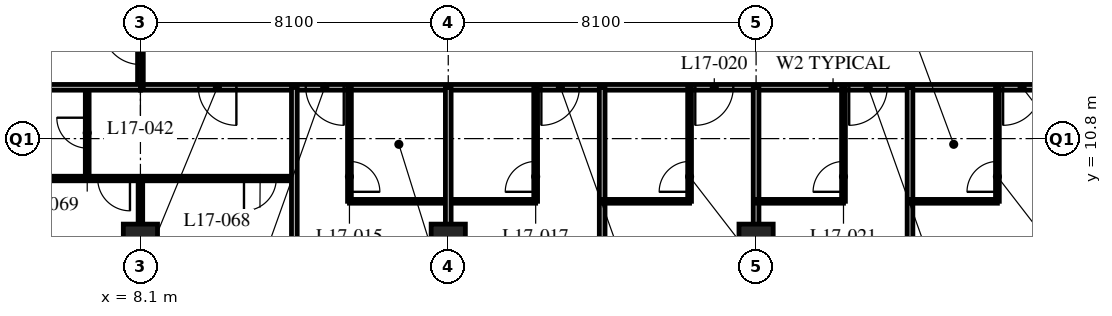
"""IFC4 building model, lengths in metres.
Left out: names, types, materials, properties, quantities, classifications, styles, units other than length and angle.
Written with IfcOpenShell. Run it as: python <this file> out.ifc"""

import sys

from ifc_helpers import new_model, si_unit, direction, frame, frame_2d, origin, origin_2d, place, context, subcontext, project, spatial, rectangle, hollow_rectangle, extrude, element, fill, save


model = new_model("IFC4")
c1 = context("Model", 3, precision=1e-05, world=origin(), true_north=direction((0.0, 1.0)))
c2 = subcontext(c1, "Body", "Model", "MODEL_VIEW")
j1 = project(units=[si_unit("LENGTHUNIT", "METRE"), si_unit("PLANEANGLEUNIT", "RADIAN")], contexts=[c1])
p1 = place(None, origin())
s1 = spatial("IfcSite", under=j1, at=p1, CompositionType="ELEMENT")
p2 = place(p1, origin())
s2 = spatial("IfcBuilding", under=s1, at=p2, CompositionType="ELEMENT")
p3 = place(p2, frame((0.0, 0.0, 70.4)))
s3 = spatial("IfcBuildingStorey", under=s2, at=p3, CompositionType="ELEMENT", Elevation=70.4)
for number, where, z_axis, x_axis in (
    (1, (8.1, 8.1, 0.0), (0.0, 0.0, 1.0), (1.0, 0.0, 0.0)),
    (2, (16.2, 8.1, 0.0), (0.0, 0.0, 1.0), (1.0, 0.0, 0.0)),
    (3, (24.3, 8.1, 0.0), (0.0, 0.0, 1.0), (1.0, 0.0, 0.0)),
):
    element("IfcColumn", number, at=place(p3, frame(where, z_axis=z_axis, x_axis=x_axis)), inside=s3, PredefinedType="COLUMN", context=c2, shape_type="SweptSolid", body=[
        extrude(hollow_rectangle(XDim=0.9, YDim=0.9, WallThickness=0.09, at=origin_2d()), origin(), (0.0, 0.0, 1.0), 3.4),
    ])
p4 = place(p3, frame((8.1, 12.15, 0.0), z_axis=(0.0, 0.0, 1.0), x_axis=(1.0, 0.0, 0.0)))
e4 = element("IfcWall", 4, at=p4, inside=s3, PredefinedType="PARTITIONING", context=c2, shape_type="SweptSolid", body=[
    extrude(rectangle(XDim=36.45, YDim=0.15, at=frame_2d((18.225, 0.0))), origin(), (0.0, 0.0, 1.0), 3.19),
])
p5 = place(p4, frame((4.35, 0.0, 0.0)))
e5 = element("IfcOpeningElement", 5, at=p5, cuts=e4, PredefinedType="OPENING", context=c2, shape_type="SweptSolid", body=[
    extrude(rectangle(XDim=1.0, YDim=2.1, at=frame_2d((0.5, 1.05))), frame((0.0, 0.085, 0.0), z_axis=(0.0, -1.0, 0.0), x_axis=(1.0, 0.0, 0.0)), (0.0, 0.0, 1.0), 0.17),
])
p6 = place(p4, frame((10.55, 0.0, 0.0)))
e6 = element("IfcOpeningElement", 6, at=p6, cuts=e4, PredefinedType="OPENING", context=c2, shape_type="SweptSolid", body=[
    extrude(rectangle(XDim=1.0, YDim=2.1, at=frame_2d((0.5, 1.05))), frame((0.0, 0.085, 0.0), z_axis=(0.0, -1.0, 0.0), x_axis=(1.0, 0.0, 0.0)), (0.0, 0.0, 1.0), 0.17),
])
p7 = place(p4, frame((14.6, 0.0, 0.0)))
e7 = element("IfcOpeningElement", 7, at=p7, cuts=e4, PredefinedType="OPENING", context=c2, shape_type="SweptSolid", body=[
    extrude(rectangle(XDim=1.0, YDim=2.1, at=frame_2d((0.5, 1.05))), frame((0.0, 0.085, 0.0), z_axis=(0.0, -1.0, 0.0), x_axis=(1.0, 0.0, 0.0)), (0.0, 0.0, 1.0), 0.17),
])
p8 = place(p4, frame((18.65, 0.0, 0.0)))
e8 = element("IfcOpeningElement", 8, at=p8, cuts=e4, PredefinedType="OPENING", context=c2, shape_type="SweptSolid", body=[
    extrude(rectangle(XDim=1.0, YDim=2.1, at=frame_2d((0.5, 1.05))), frame((0.0, 0.085, 0.0), z_axis=(0.0, -1.0, 0.0), x_axis=(1.0, 0.0, 0.0)), (0.0, 0.0, 1.0), 0.17),
])
p9 = place(p4, frame((22.7, 0.0, 0.0)))
e9 = element("IfcOpeningElement", 9, at=p9, cuts=e4, PredefinedType="OPENING", context=c2, shape_type="SweptSolid", body=[
    extrude(rectangle(XDim=1.0, YDim=2.1, at=frame_2d((0.5, 1.05))), frame((0.0, 0.085, 0.0), z_axis=(0.0, -1.0, 0.0), x_axis=(1.0, 0.0, 0.0)), (0.0, 0.0, 1.0), 0.17),
])
p10 = place(p4, frame((24.6, 0.0, 0.0)))
e10 = element("IfcOpeningElement", 10, at=p10, cuts=e4, PredefinedType="OPENING", context=c2, shape_type="SweptSolid", body=[
    extrude(rectangle(XDim=1.0, YDim=2.1, at=frame_2d((0.5, 1.05))), frame((0.0, 0.085, 0.0), z_axis=(0.0, -1.0, 0.0), x_axis=(1.0, 0.0, 0.0)), (0.0, 0.0, 1.0), 0.17),
])
p11 = place(p4, frame((30.8, 0.0, 0.0)))
e11 = element("IfcOpeningElement", 11, at=p11, cuts=e4, PredefinedType="OPENING", context=c2, shape_type="SweptSolid", body=[
    extrude(rectangle(XDim=1.0, YDim=2.1, at=frame_2d((0.5, 1.05))), frame((0.0, 0.085, 0.0), z_axis=(0.0, -1.0, 0.0), x_axis=(1.0, 0.0, 0.0)), (0.0, 0.0, 1.0), 0.17),
])
p12 = place(p4, frame((1.525, 0.0, 0.0)))
e12 = element("IfcOpeningElement", 12, at=p12, cuts=e4, PredefinedType="OPENING", context=c2, shape_type="SweptSolid", body=[
    extrude(rectangle(XDim=1.0, YDim=2.1, at=frame_2d((0.5, 1.05))), frame((0.0, 0.085, 0.0), z_axis=(0.0, -1.0, 0.0), x_axis=(1.0, 0.0, 0.0)), (0.0, 0.0, 1.0), 0.17),
])
p13 = place(p4, frame((33.925, 0.0, 0.0)))
e13 = element("IfcOpeningElement", 13, at=p13, cuts=e4, PredefinedType="OPENING", context=c2, shape_type="SweptSolid", body=[
    extrude(rectangle(XDim=1.0, YDim=2.1, at=frame_2d((0.5, 1.05))), frame((0.0, 0.085, 0.0), z_axis=(0.0, -1.0, 0.0), x_axis=(1.0, 0.0, 0.0)), (0.0, 0.0, 1.0), 0.17),
])
p14 = place(p3, frame((8.1, 12.15, 0.0), z_axis=(0.0, 0.0, 1.0), x_axis=(0.0, 1.0, 0.0)))
e14 = element("IfcWall", 14, at=p14, inside=s3, PredefinedType="PARTITIONING", context=c2, shape_type="SweptSolid", body=[
    extrude(rectangle(XDim=30.15, YDim=0.15, at=frame_2d((15.075, 0.0))), origin(), (0.0, 0.0, 1.0), 2.578),
])
p15 = place(p14, frame((0.6, 0.0, 0.0)))
e15 = element("IfcOpeningElement", 15, at=p15, cuts=e14, PredefinedType="OPENING", context=c2, shape_type="SweptSolid", body=[
    extrude(rectangle(XDim=1.0, YDim=2.1, at=frame_2d((0.5, 1.05))), frame((0.0, 0.085, 0.0), z_axis=(0.0, -1.0, 0.0), x_axis=(1.0, 0.0, 0.0)), (0.0, 0.0, 1.0), 0.17),
])
p16 = place(p14, frame((6.8, 0.0, 0.0)))
e16 = element("IfcOpeningElement", 16, at=p16, cuts=e14, PredefinedType="OPENING", context=c2, shape_type="SweptSolid", body=[
    extrude(rectangle(XDim=1.0, YDim=2.1, at=frame_2d((0.5, 1.05))), frame((0.0, 0.085, 0.0), z_axis=(0.0, -1.0, 0.0), x_axis=(1.0, 0.0, 0.0)), (0.0, 0.0, 1.0), 0.17),
])
p17 = place(p14, frame((8.7, 0.0, 0.0)))
e17 = element("IfcOpeningElement", 17, at=p17, cuts=e14, PredefinedType="OPENING", context=c2, shape_type="SweptSolid", body=[
    extrude(rectangle(XDim=1.0, YDim=2.1, at=frame_2d((0.5, 1.05))), frame((0.0, 0.085, 0.0), z_axis=(0.0, -1.0, 0.0), x_axis=(1.0, 0.0, 0.0)), (0.0, 0.0, 1.0), 0.17),
])
p18 = place(p14, frame((14.6, 0.0, 0.0)))
e18 = element("IfcOpeningElement", 18, at=p18, cuts=e14, PredefinedType="OPENING", context=c2, shape_type="SweptSolid", body=[
    extrude(rectangle(XDim=1.0, YDim=2.1, at=frame_2d((0.5, 1.05))), frame((0.0, 0.085, 0.0), z_axis=(0.0, -1.0, 0.0), x_axis=(1.0, 0.0, 0.0)), (0.0, 0.0, 1.0), 0.17),
])
p19 = place(p14, frame((21.65, 0.0, 0.0)))
e19 = element("IfcOpeningElement", 19, at=p19, cuts=e14, PredefinedType="OPENING", context=c2, shape_type="SweptSolid", body=[
    extrude(rectangle(XDim=1.0, YDim=2.1, at=frame_2d((0.5, 1.05))), frame((0.0, 0.085, 0.0), z_axis=(0.0, -1.0, 0.0), x_axis=(1.0, 0.0, 0.0)), (0.0, 0.0, 1.0), 0.17),
])
p20 = place(p14, frame((26.75, 0.0, 0.0)))
e20 = element("IfcOpeningElement", 20, at=p20, cuts=e14, PredefinedType="OPENING", context=c2, shape_type="SweptSolid", body=[
    extrude(rectangle(XDim=1.0, YDim=2.1, at=frame_2d((0.5, 1.05))), frame((0.0, 0.085, 0.0), z_axis=(0.0, -1.0, 0.0), x_axis=(1.0, 0.0, 0.0)), (0.0, 0.0, 1.0), 0.17),
])
p21 = place(p3, frame((13.6, 9.15, 0.0), z_axis=(0.0, 0.0, 1.0), x_axis=(1.0, 0.0, 0.0)))
e21 = element("IfcWall", 21, at=p21, inside=s3, PredefinedType="PARTITIONING", context=c2, shape_type="SweptSolid", body=[
    extrude(rectangle(XDim=4.9, YDim=0.1, at=frame_2d((2.45, 0.0))), origin(), (0.0, 0.0, 1.0), 3.19),
])
p22 = place(p3, frame((13.6, 12.15, 0.0), z_axis=(0.0, 0.0, 1.0), x_axis=(0.0, -1.0, 0.0)))
e22 = element("IfcWall", 22, at=p22, inside=s3, PredefinedType="PARTITIONING", context=c2, shape_type="SweptSolid", body=[
    extrude(rectangle(XDim=3.0, YDim=0.1, at=frame_2d((1.5, 0.0))), origin(), (0.0, 0.0, 1.0), 3.19),
])
p23 = place(p22, frame((1.95, 0.0, 0.0)))
e23 = element("IfcOpeningElement", 23, at=p23, cuts=e22, PredefinedType="OPENING", context=c2, shape_type="SweptSolid", body=[
    extrude(rectangle(XDim=0.8, YDim=2.1, at=frame_2d((0.4, 1.05))), frame((0.0, 0.06, 0.0), z_axis=(0.0, -1.0, 0.0), x_axis=(1.0, 0.0, 0.0)), (0.0, 0.0, 1.0), 0.12),
])
p24 = place(p3, frame((16.2, 12.15, 0.0), z_axis=(0.0, 0.0, 1.0), x_axis=(0.0, -1.0, 0.0)))
e24 = element("IfcWall", 24, at=p24, inside=s3, PredefinedType="PARTITIONING", context=c2, shape_type="SweptSolid", body=[
    extrude(rectangle(XDim=11.85, YDim=0.15, at=frame_2d((5.925, 0.0))), origin(), (0.0, 0.0, 1.0), 2.578),
])
p25 = place(p3, frame((18.5, 12.15, 0.0), z_axis=(0.0, 0.0, 1.0), x_axis=(0.0, -1.0, 0.0)))
e25 = element("IfcWall", 25, at=p25, inside=s3, PredefinedType="PARTITIONING", context=c2, shape_type="SweptSolid", body=[
    extrude(rectangle(XDim=3.0, YDim=0.1, at=frame_2d((1.5, 0.0))), origin(), (0.0, 0.0, 1.0), 3.19),
])
p26 = place(p25, frame((1.95, 0.0, 0.0)))
e26 = element("IfcOpeningElement", 26, at=p26, cuts=e25, PredefinedType="OPENING", context=c2, shape_type="SweptSolid", body=[
    extrude(rectangle(XDim=0.8, YDim=2.1, at=frame_2d((0.4, 1.05))), frame((0.0, 0.06, 0.0), z_axis=(0.0, -1.0, 0.0), x_axis=(1.0, 0.0, 0.0)), (0.0, 0.0, 1.0), 0.12),
])
p27 = place(p3, frame((20.25, 12.15, 0.0), z_axis=(0.0, 0.0, 1.0), x_axis=(0.0, -1.0, 0.0)))
e27 = element("IfcWall", 27, at=p27, inside=s3, PredefinedType="PARTITIONING", context=c2, shape_type="SweptSolid", body=[
    extrude(rectangle(XDim=11.85, YDim=0.15, at=frame_2d((5.925, 0.0))), origin(), (0.0, 0.0, 1.0), 3.19),
])
p28 = place(p3, frame((20.25, 9.15, 0.0), z_axis=(0.0, 0.0, 1.0), x_axis=(1.0, 0.0, 0.0)))
e28 = element("IfcWall", 28, at=p28, inside=s3, PredefinedType="PARTITIONING", context=c2, shape_type="SweptSolid", body=[
    extrude(rectangle(XDim=2.3, YDim=0.1, at=frame_2d((1.15, 0.0))), origin(), (0.0, 0.0, 1.0), 3.19),
])
p29 = place(p3, frame((22.55, 12.15, 0.0), z_axis=(0.0, 0.0, 1.0), x_axis=(0.0, -1.0, 0.0)))
e29 = element("IfcWall", 29, at=p29, inside=s3, PredefinedType="PARTITIONING", context=c2, shape_type="SweptSolid", body=[
    extrude(rectangle(XDim=3.0, YDim=0.1, at=frame_2d((1.5, 0.0))), origin(), (0.0, 0.0, 1.0), 3.19),
])
p30 = place(p29, frame((1.95, 0.0, 0.0)))
e30 = element("IfcOpeningElement", 30, at=p30, cuts=e29, PredefinedType="OPENING", context=c2, shape_type="SweptSolid", body=[
    extrude(rectangle(XDim=0.8, YDim=2.1, at=frame_2d((0.4, 1.05))), frame((0.0, 0.06, 0.0), z_axis=(0.0, -1.0, 0.0), x_axis=(1.0, 0.0, 0.0)), (0.0, 0.0, 1.0), 0.12),
])
p31 = place(p3, frame((24.3, 12.15, 0.0), z_axis=(0.0, 0.0, 1.0), x_axis=(0.0, -1.0, 0.0)))
e31 = element("IfcWall", 31, at=p31, inside=s3, PredefinedType="PARTITIONING", context=c2, shape_type="SweptSolid", body=[
    extrude(rectangle(XDim=11.85, YDim=0.15, at=frame_2d((5.925, 0.0))), origin(), (0.0, 0.0, 1.0), 2.578),
])
p32 = place(p3, frame((24.3, 9.15, 0.0), z_axis=(0.0, 0.0, 1.0), x_axis=(1.0, 0.0, 0.0)))
e32 = element("IfcWall", 32, at=p32, inside=s3, PredefinedType="PARTITIONING", context=c2, shape_type="SweptSolid", body=[
    extrude(rectangle(XDim=2.3, YDim=0.1, at=frame_2d((1.15, 0.0))), origin(), (0.0, 0.0, 1.0), 3.19),
])
p33 = place(p3, frame((26.6, 12.15, 0.0), z_axis=(0.0, 0.0, 1.0), x_axis=(0.0, -1.0, 0.0)))
e33 = element("IfcWall", 33, at=p33, inside=s3, PredefinedType="PARTITIONING", context=c2, shape_type="SweptSolid", body=[
    extrude(rectangle(XDim=3.0, YDim=0.1, at=frame_2d((1.5, 0.0))), origin(), (0.0, 0.0, 1.0), 3.19),
])
p34 = place(p33, frame((1.95, 0.0, 0.0)))
e34 = element("IfcOpeningElement", 34, at=p34, cuts=e33, PredefinedType="OPENING", context=c2, shape_type="SweptSolid", body=[
    extrude(rectangle(XDim=0.8, YDim=2.1, at=frame_2d((0.4, 1.05))), frame((0.0, 0.06, 0.0), z_axis=(0.0, -1.0, 0.0), x_axis=(1.0, 0.0, 0.0)), (0.0, 0.0, 1.0), 0.12),
])
p35 = place(p3, frame((28.35, 12.15, 0.0), z_axis=(0.0, 0.0, 1.0), x_axis=(0.0, -1.0, 0.0)))
e35 = element("IfcWall", 35, at=p35, inside=s3, PredefinedType="PARTITIONING", context=c2, shape_type="SweptSolid", body=[
    extrude(rectangle(XDim=11.85, YDim=0.15, at=frame_2d((5.925, 0.0))), origin(), (0.0, 0.0, 1.0), 3.19),
])
p36 = place(p3, frame((28.35, 9.15, 0.0), z_axis=(0.0, 0.0, 1.0), x_axis=(1.0, 0.0, 0.0)))
e36 = element("IfcWall", 36, at=p36, inside=s3, PredefinedType="PARTITIONING", context=c2, shape_type="SweptSolid", body=[
    extrude(rectangle(XDim=2.3, YDim=0.1, at=frame_2d((1.15, 0.0))), origin(), (0.0, 0.0, 1.0), 3.19),
])
p37 = place(p3, frame((30.65, 12.15, 0.0), z_axis=(0.0, 0.0, 1.0), x_axis=(0.0, -1.0, 0.0)))
e37 = element("IfcWall", 37, at=p37, inside=s3, PredefinedType="PARTITIONING", context=c2, shape_type="SweptSolid", body=[
    extrude(rectangle(XDim=3.0, YDim=0.1, at=frame_2d((1.5, 0.0))), origin(), (0.0, 0.0, 1.0), 3.19),
])
p38 = place(p37, frame((1.95, 0.0, 0.0)))
e38 = element("IfcOpeningElement", 38, at=p38, cuts=e37, PredefinedType="OPENING", context=c2, shape_type="SweptSolid", body=[
    extrude(rectangle(XDim=0.8, YDim=2.1, at=frame_2d((0.4, 1.05))), frame((0.0, 0.06, 0.0), z_axis=(0.0, -1.0, 0.0), x_axis=(1.0, 0.0, 0.0)), (0.0, 0.0, 1.0), 0.12),
])
p39 = place(p3, frame((6.7, 12.15, 0.0), z_axis=(0.0, 0.0, 1.0), x_axis=(0.0, -1.0, 0.0)))
e39 = element("IfcWall", 39, at=p39, inside=s3, PredefinedType="PARTITIONING", context=c2, shape_type="SweptSolid", body=[
    extrude(rectangle(XDim=2.4, YDim=0.1, at=frame_2d((1.2, 0.0))), origin(), (0.0, 0.0, 1.0), 3.19),
])
p40 = place(p39, frame((0.8, 0.0, 0.0)))
e40 = element("IfcOpeningElement", 40, at=p40, cuts=e39, PredefinedType="OPENING", context=c2, shape_type="SweptSolid", body=[
    extrude(rectangle(XDim=0.8, YDim=2.1, at=frame_2d((0.4, 1.05))), frame((0.0, 0.06, 0.0), z_axis=(0.0, -1.0, 0.0), x_axis=(1.0, 0.0, 0.0)), (0.0, 0.0, 1.0), 0.12),
])
p41 = place(p3, frame((4.1, 9.75, 0.0), z_axis=(0.0, 0.0, 1.0), x_axis=(1.0, 0.0, 0.0)))
e41 = element("IfcWall", 41, at=p41, inside=s3, PredefinedType="PARTITIONING", context=c2, shape_type="SweptSolid", body=[
    extrude(rectangle(XDim=8.05, YDim=0.12, at=frame_2d((4.025, 0.0))), origin(), (0.0, 0.0, 1.0), 3.19),
])
p42 = place(p41, frame((6.725, 0.0, 0.0)))
e42 = element("IfcOpeningElement", 42, at=p42, cuts=e41, PredefinedType="OPENING", context=c2, shape_type="SweptSolid", body=[
    extrude(rectangle(XDim=0.85, YDim=2.1, at=frame_2d((0.425, 1.05))), frame((0.0, 0.07, 0.0), z_axis=(0.0, -1.0, 0.0), x_axis=(1.0, 0.0, 0.0)), (0.0, 0.0, 1.0), 0.14),
])
p43 = place(p41, frame((2.875, 0.0, 0.0)))
e43 = element("IfcOpeningElement", 43, at=p43, cuts=e41, PredefinedType="OPENING", context=c2, shape_type="SweptSolid", body=[
    extrude(rectangle(XDim=0.85, YDim=2.1, at=frame_2d((0.425, 1.05))), frame((0.0, 0.07, 0.0), z_axis=(0.0, -1.0, 0.0), x_axis=(1.0, 0.0, 0.0)), (0.0, 0.0, 1.0), 0.14),
])
p44 = place(p3, frame((8.1, 9.75, 0.0), z_axis=(0.0, 0.0, 1.0), x_axis=(0.0, -1.0, 0.0)))
e44 = element("IfcWall", 44, at=p44, inside=s3, PredefinedType="PARTITIONING", context=c2, shape_type="SweptSolid", body=[
    extrude(rectangle(XDim=5.4, YDim=0.12, at=frame_2d((2.7, 0.0))), origin(), (0.0, 0.0, 1.0), 2.578),
])
p45 = place(p3, frame((0.3, 12.15, 0.0), z_axis=(0.0, 0.0, 1.0), x_axis=(1.0, 0.0, 0.0)))
e45 = element("IfcWall", 45, at=p45, inside=s3, PredefinedType="PARTITIONING", context=c2, shape_type="SweptSolid", body=[
    extrude(rectangle(XDim=7.8, YDim=0.15, at=frame_2d((3.9, 0.0))), origin(), (0.0, 0.0, 1.0), 3.19),
])
p46 = place(p3, frame((12.15, 12.15, 0.0), z_axis=(0.0, 0.0, 1.0), x_axis=(0.0, -1.0, 0.0)))
e46 = element("IfcWall", 46, at=p46, inside=s3, PredefinedType="PARTITIONING", context=c2, shape_type="SweptSolid", body=[
    extrude(rectangle(XDim=11.85, YDim=0.15, at=frame_2d((5.925, 0.0))), origin(), (0.0, 0.0, 1.0), 3.19),
])
p47 = place(p23, origin())
e47 = element("IfcDoor", 47, at=p47, inside=s3, OperationType="SINGLE_SWING_RIGHT", PredefinedType="DOOR", context=c2, shape_type="SweptSolid", body=[
    extrude(rectangle(XDim=0.8, YDim=2.1, at=frame_2d((0.4, 1.05))), frame((0.0, 0.025, 0.0), z_axis=(0.0, -1.0, 0.0), x_axis=(1.0, 0.0, 0.0)), (0.0, 0.0, 1.0), 0.05),
])
fill(e23, e47)
p48 = place(p5, origin())
e48 = element("IfcDoor", 48, at=p48, inside=s3, OperationType="SINGLE_SWING_LEFT", PredefinedType="DOOR", context=c2, shape_type="SweptSolid", body=[
    extrude(rectangle(XDim=1.0, YDim=2.1, at=frame_2d((0.5, 1.05))), frame((0.0, 0.025, 0.0), z_axis=(0.0, -1.0, 0.0), x_axis=(1.0, 0.0, 0.0)), (0.0, 0.0, 1.0), 0.05),
])
fill(e5, e48)
p49 = place(p26, origin())
e49 = element("IfcDoor", 49, at=p49, inside=s3, OperationType="SINGLE_SWING_LEFT", PredefinedType="DOOR", context=c2, shape_type="SweptSolid", body=[
    extrude(rectangle(XDim=0.8, YDim=2.1, at=frame_2d((0.4, 1.05))), frame((0.0, 0.025, 0.0), z_axis=(0.0, -1.0, 0.0), x_axis=(1.0, 0.0, 0.0)), (0.0, 0.0, 1.0), 0.05),
])
fill(e26, e49)
p50 = place(p6, origin())
e50 = element("IfcDoor", 50, at=p50, inside=s3, OperationType="SINGLE_SWING_RIGHT", PredefinedType="DOOR", context=c2, shape_type="SweptSolid", body=[
    extrude(rectangle(XDim=1.0, YDim=2.1, at=frame_2d((0.5, 1.05))), frame((0.0, 0.025, 0.0), z_axis=(0.0, -1.0, 0.0), x_axis=(1.0, 0.0, 0.0)), (0.0, 0.0, 1.0), 0.05),
])
fill(e6, e50)
p51 = place(p30, origin())
e51 = element("IfcDoor", 51, at=p51, inside=s3, OperationType="SINGLE_SWING_LEFT", PredefinedType="DOOR", context=c2, shape_type="SweptSolid", body=[
    extrude(rectangle(XDim=0.8, YDim=2.1, at=frame_2d((0.4, 1.05))), frame((0.0, 0.025, 0.0), z_axis=(0.0, -1.0, 0.0), x_axis=(1.0, 0.0, 0.0)), (0.0, 0.0, 1.0), 0.05),
])
fill(e30, e51)
p52 = place(p7, origin())
e52 = element("IfcDoor", 52, at=p52, inside=s3, OperationType="SINGLE_SWING_RIGHT", PredefinedType="DOOR", context=c2, shape_type="SweptSolid", body=[
    extrude(rectangle(XDim=1.0, YDim=2.1, at=frame_2d((0.5, 1.05))), frame((0.0, 0.025, 0.0), z_axis=(0.0, -1.0, 0.0), x_axis=(1.0, 0.0, 0.0)), (0.0, 0.0, 1.0), 0.05),
])
fill(e7, e52)
p53 = place(p34, origin())
e53 = element("IfcDoor", 53, at=p53, inside=s3, OperationType="SINGLE_SWING_LEFT", PredefinedType="DOOR", context=c2, shape_type="SweptSolid", body=[
    extrude(rectangle(XDim=0.8, YDim=2.1, at=frame_2d((0.4, 1.05))), frame((0.0, 0.025, 0.0), z_axis=(0.0, -1.0, 0.0), x_axis=(1.0, 0.0, 0.0)), (0.0, 0.0, 1.0), 0.05),
])
fill(e34, e53)
p54 = place(p8, origin())
e54 = element("IfcDoor", 54, at=p54, inside=s3, OperationType="SINGLE_SWING_RIGHT", PredefinedType="DOOR", context=c2, shape_type="SweptSolid", body=[
    extrude(rectangle(XDim=1.0, YDim=2.1, at=frame_2d((0.5, 1.05))), frame((0.0, 0.025, 0.0), z_axis=(0.0, -1.0, 0.0), x_axis=(1.0, 0.0, 0.0)), (0.0, 0.0, 1.0), 0.05),
])
fill(e8, e54)
p55 = place(p38, origin())
e55 = element("IfcDoor", 55, at=p55, inside=s3, OperationType="SINGLE_SWING_LEFT", PredefinedType="DOOR", context=c2, shape_type="SweptSolid", body=[
    extrude(rectangle(XDim=0.8, YDim=2.1, at=frame_2d((0.4, 1.05))), frame((0.0, 0.025, 0.0), z_axis=(0.0, -1.0, 0.0), x_axis=(1.0, 0.0, 0.0)), (0.0, 0.0, 1.0), 0.05),
])
fill(e38, e55)
p56 = place(p9, origin())
e56 = element("IfcDoor", 56, at=p56, inside=s3, OperationType="SINGLE_SWING_RIGHT", PredefinedType="DOOR", context=c2, shape_type="SweptSolid", body=[
    extrude(rectangle(XDim=1.0, YDim=2.1, at=frame_2d((0.5, 1.05))), frame((0.0, 0.025, 0.0), z_axis=(0.0, -1.0, 0.0), x_axis=(1.0, 0.0, 0.0)), (0.0, 0.0, 1.0), 0.05),
])
fill(e9, e56)
p57 = place(p15, origin())
e57 = element("IfcDoor", 57, at=p57, inside=s3, OperationType="SINGLE_SWING_RIGHT", PredefinedType="DOOR", context=c2, shape_type="SweptSolid", body=[
    extrude(rectangle(XDim=1.0, YDim=2.1, at=frame_2d((0.5, 1.05))), frame((0.0, 0.025, 0.0), z_axis=(0.0, -1.0, 0.0), x_axis=(1.0, 0.0, 0.0)), (0.0, 0.0, 1.0), 0.05),
])
fill(e15, e57)
p58 = place(p12, origin())
e58 = element("IfcDoor", 58, at=p58, inside=s3, OperationType="SINGLE_SWING_LEFT", PredefinedType="DOOR", context=c2, shape_type="SweptSolid", body=[
    extrude(rectangle(XDim=1.0, YDim=2.1, at=frame_2d((0.5, 1.05))), frame((0.0, 0.025, 0.0), z_axis=(0.0, -1.0, 0.0), x_axis=(1.0, 0.0, 0.0)), (0.0, 0.0, 1.0), 0.05),
])
fill(e12, e58)
p59 = place(p42, origin())
e59 = element("IfcDoor", 59, at=p59, inside=s3, OperationType="SINGLE_SWING_RIGHT", PredefinedType="DOOR", context=c2, shape_type="SweptSolid", body=[
    extrude(rectangle(XDim=0.85, YDim=2.1, at=frame_2d((0.425, 1.05))), frame((0.0, 0.025, 0.0), z_axis=(0.0, -1.0, 0.0), x_axis=(1.0, 0.0, 0.0)), (0.0, 0.0, 1.0), 0.05),
])
fill(e42, e59)
p60 = place(p40, origin())
e60 = element("IfcDoor", 60, at=p60, inside=s3, OperationType="SINGLE_SWING_RIGHT", PredefinedType="DOOR", context=c2, shape_type="SweptSolid", body=[
    extrude(rectangle(XDim=0.8, YDim=2.1, at=frame_2d((0.4, 1.05))), frame((0.0, 0.025, 0.0), z_axis=(0.0, -1.0, 0.0), x_axis=(1.0, 0.0, 0.0)), (0.0, 0.0, 1.0), 0.05),
])
fill(e40, e60)
p61 = place(p43, origin())
e61 = element("IfcDoor", 61, at=p61, inside=s3, OperationType="SINGLE_SWING_LEFT", PredefinedType="DOOR", context=c2, shape_type="SweptSolid", body=[
    extrude(rectangle(XDim=0.85, YDim=2.1, at=frame_2d((0.425, 1.05))), frame((0.0, 0.025, 0.0), z_axis=(0.0, -1.0, 0.0), x_axis=(1.0, 0.0, 0.0)), (0.0, 0.0, 1.0), 0.05),
])
fill(e43, e61)
save(model, sys.argv[1])
